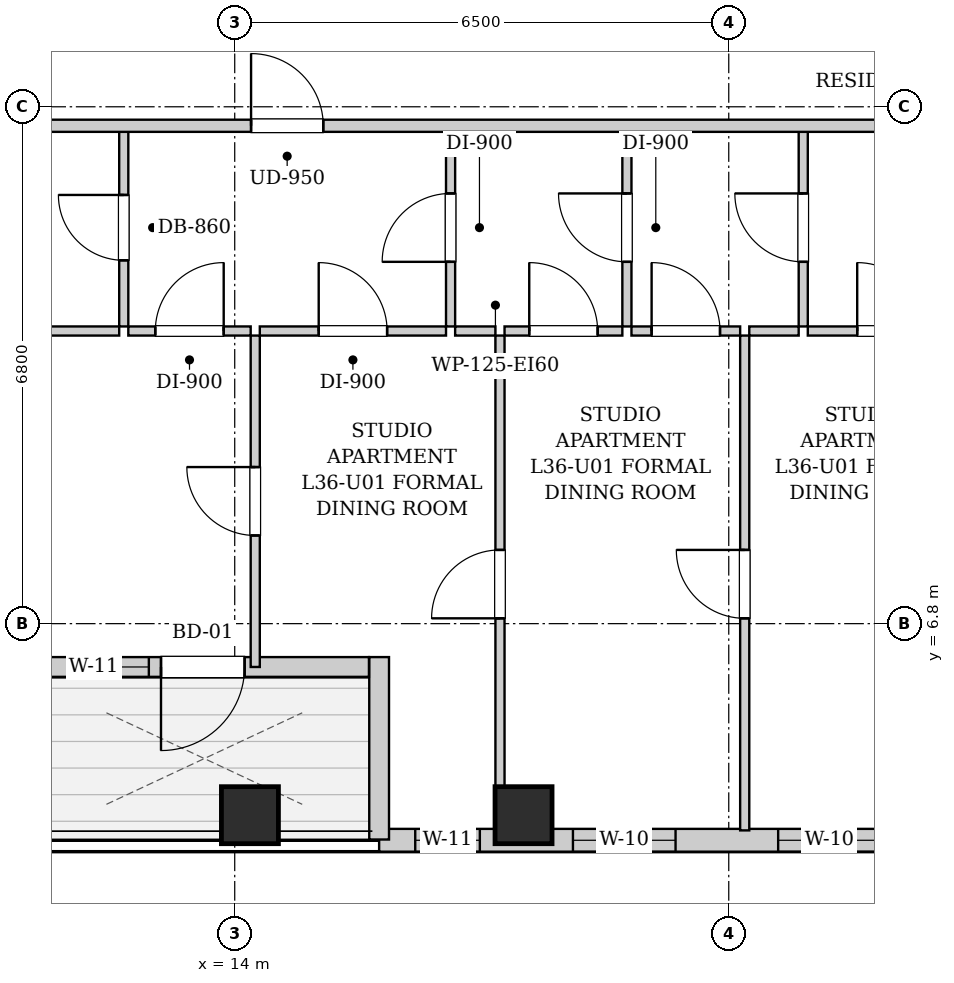
"""IFC4 building model, lengths in metres.
Left out: names, types, materials, properties, quantities, classifications, styles, units other than length and angle.
Written with IfcOpenShell. Run it as: python <this file> out.ifc"""

import sys

from ifc_helpers import new_model, si_unit, direction, frame, frame_2d, origin, origin_2d, place, context, subcontext, project, spatial, rectangle, extrude, element, fill, save


model = new_model("IFC4")
c1 = context("Model", 3, precision=1e-05, world=origin(), true_north=direction((0.0, 1.0)))
c2 = subcontext(c1, "Body", "Model", "MODEL_VIEW")
j1 = project(units=[si_unit("LENGTHUNIT", "METRE"), si_unit("PLANEANGLEUNIT", "RADIAN")], contexts=[c1])
p1 = place(None, origin())
s1 = spatial("IfcSite", under=j1, at=p1, CompositionType="ELEMENT")
p2 = place(p1, origin())
s2 = spatial("IfcBuilding", under=s1, at=p2, CompositionType="ELEMENT")
p3 = place(p2, frame((0.0, 0.0, 127.65)))
s3 = spatial("IfcBuildingStorey", under=s2, at=p3, CompositionType="ELEMENT", Elevation=127.65)
for number, where, z_axis, x_axis in (
    (1, (14.2, 4.28, 0.0), (0.0, 0.0, 1.0), (1.0, 0.0, 0.0)),
    (2, (17.8, 4.28, 0.0), (0.0, 0.0, 1.0), (1.0, 0.0, 0.0)),
):
    element("IfcColumn", number, at=place(p3, frame(where, z_axis=z_axis, x_axis=x_axis)), inside=s3, PredefinedType="COLUMN", context=c2, shape_type="SweptSolid", body=[
        extrude(rectangle(XDim=0.75, YDim=0.75, at=origin_2d()), origin(), (0.0, 0.0, 1.0), 3.25),
    ])
p4 = place(p3, frame((31.5, 3.95, 0.0), z_axis=(0.0, 0.0, 1.0), x_axis=(-1.0, 0.0, 0.0)))
e3 = element("IfcWall", 3, at=p4, inside=s3, PredefinedType="SOLIDWALL", context=c2, shape_type="SweptSolid", body=[
    extrude(rectangle(XDim=15.6, YDim=0.3, at=frame_2d((7.8, 0.0))), origin(), (0.0, 0.0, 1.0), 2.99),
])
p5 = place(p4, frame((14.275, 0.0, 0.55)))
e4 = element("IfcOpeningElement", 4, at=p5, cuts=e3, PredefinedType="OPENING", context=c2, shape_type="SweptSolid", body=[
    extrude(rectangle(XDim=0.85, YDim=1.2, at=frame_2d((0.425, 0.6))), frame((0.0, 0.16, 0.0), z_axis=(0.0, -1.0, 0.0), x_axis=(1.0, 0.0, 0.0)), (0.0, 0.0, 1.0), 0.32),
])
p6 = place(p4, frame((11.7, 0.0, 0.55)))
e5 = element("IfcOpeningElement", 5, at=p6, cuts=e3, PredefinedType="OPENING", context=c2, shape_type="SweptSolid", body=[
    extrude(rectangle(XDim=1.35, YDim=1.2, at=frame_2d((0.675, 0.6))), frame((0.0, 0.16, 0.0), z_axis=(0.0, -1.0, 0.0), x_axis=(1.0, 0.0, 0.0)), (0.0, 0.0, 1.0), 0.32),
])
p7 = place(p4, frame((9.0, 0.0, 0.55)))
e6 = element("IfcOpeningElement", 6, at=p7, cuts=e3, PredefinedType="OPENING", context=c2, shape_type="SweptSolid", body=[
    extrude(rectangle(XDim=1.35, YDim=1.2, at=frame_2d((0.675, 0.6))), frame((0.0, 0.16, 0.0), z_axis=(0.0, -1.0, 0.0), x_axis=(1.0, 0.0, 0.0)), (0.0, 0.0, 1.0), 0.32),
])
p8 = place(p4, frame((2.1, 0.0, 0.55)))
e7 = element("IfcOpeningElement", 7, at=p8, cuts=e3, PredefinedType="OPENING", context=c2, shape_type="SweptSolid", body=[
    extrude(rectangle(XDim=1.35, YDim=1.2, at=frame_2d((0.675, 0.6))), frame((0.0, 0.16, 0.0), z_axis=(0.0, -1.0, 0.0), x_axis=(1.0, 0.0, 0.0)), (0.0, 0.0, 1.0), 0.32),
])
p9 = place(p4, frame((0.23, 0.0, 0.55)))
e8 = element("IfcOpeningElement", 8, at=p9, cuts=e3, PredefinedType="OPENING", context=c2, shape_type="SweptSolid", body=[
    extrude(rectangle(XDim=0.68, YDim=1.2, at=frame_2d((0.34, 0.6))), frame((0.0, 0.16, 0.0), z_axis=(0.0, -1.0, 0.0), x_axis=(1.0, 0.0, 0.0)), (0.0, 0.0, 1.0), 0.32),
])
p10 = place(p3, frame((15.9, 3.96, 0.0), z_axis=(0.0, 0.0, 1.0), x_axis=(0.0, 1.0, 0.0)))
e9 = element("IfcWall", 9, at=p10, inside=s3, PredefinedType="SOLIDWALL", context=c2, shape_type="SweptSolid", body=[
    extrude(rectangle(XDim=2.4, YDim=0.26, at=frame_2d((1.2, 0.0))), origin(), (0.0, 0.0, 1.0), 2.99),
])
p11 = place(p3, frame((15.766, 6.23, 0.0), z_axis=(0.0, 0.0, 1.0), x_axis=(-1.0, 0.0, 0.0)))
e10 = element("IfcWall", 10, at=p11, inside=s3, PredefinedType="SOLIDWALL", context=c2, shape_type="SweptSolid", body=[
    extrude(rectangle(XDim=4.332, YDim=0.26, at=frame_2d((2.166, 0.0))), origin(), (0.0, 0.0, 1.0), 2.99),
])
p12 = place(p11, frame((1.636, 0.0, 0.0)))
e11 = element("IfcOpeningElement", 11, at=p12, cuts=e10, PredefinedType="OPENING", context=c2, shape_type="SweptSolid", body=[
    extrude(rectangle(XDim=1.1, YDim=2.0, at=frame_2d((0.55, 1.0))), frame((0.0, 0.14, 0.0), z_axis=(0.0, -1.0, 0.0), x_axis=(1.0, 0.0, 0.0)), (0.0, 0.0, 1.0), 0.28),
])
p13 = place(p11, frame((2.896, 0.0, 0.55)))
e12 = element("IfcOpeningElement", 12, at=p13, cuts=e10, PredefinedType="OPENING", context=c2, shape_type="SweptSolid", body=[
    extrude(rectangle(XDim=0.85, YDim=1.2, at=frame_2d((0.425, 0.6))), frame((0.0, 0.14, 0.0), z_axis=(0.0, -1.0, 0.0), x_axis=(1.0, 0.0, 0.0)), (0.0, 0.0, 1.0), 0.28),
])
p14 = place(p3, frame((12.54, 10.71, 0.0), z_axis=(0.0, 0.0, 1.0), x_axis=(0.0, 1.0, 0.0)))
e13 = element("IfcWall", 13, at=p14, inside=s3, PredefinedType="PARTITIONING", context=c2, shape_type="SweptSolid", body=[
    extrude(rectangle(XDim=2.6, YDim=0.12, at=frame_2d((1.3, 0.0))), origin(), (0.0, 0.0, 1.0), 2.99),
])
p15 = place(p14, frame((0.87, 0.0, 0.0)))
e14 = element("IfcOpeningElement", 14, at=p15, cuts=e13, PredefinedType="OPENING", context=c2, shape_type="SweptSolid", body=[
    extrude(rectangle(XDim=0.86, YDim=2.05, at=frame_2d((0.43, 1.025))), frame((0.0, 0.07, 0.0), z_axis=(0.0, -1.0, 0.0), x_axis=(1.0, 0.0, 0.0)), (0.0, 0.0, 1.0), 0.14),
])
p16 = place(p3, frame((11.11, 10.65, 0.0), z_axis=(0.0, 0.0, 1.0), x_axis=(1.0, 0.0, 0.0)))
e15 = element("IfcWall", 15, at=p16, inside=s3, PredefinedType="PARTITIONING", context=c2, shape_type="SweptSolid", body=[
    extrude(rectangle(XDim=1.37, YDim=0.12, at=frame_2d((0.685, 0.0))), origin(), (0.0, 0.0, 1.0), 2.99),
])
p17 = place(p3, frame((16.84, 10.71, 0.0), z_axis=(0.0, 0.0, 1.0), x_axis=(0.0, 1.0, 0.0)))
e16 = element("IfcWall", 16, at=p17, inside=s3, PredefinedType="PARTITIONING", context=c2, shape_type="SweptSolid", body=[
    extrude(rectangle(XDim=2.6, YDim=0.12, at=frame_2d((1.3, 0.0))), origin(), (0.0, 0.0, 1.0), 2.99),
])
p18 = place(p17, frame((0.85, 0.0, 0.0)))
e17 = element("IfcOpeningElement", 17, at=p18, cuts=e16, PredefinedType="OPENING", context=c2, shape_type="SweptSolid", body=[
    extrude(rectangle(XDim=0.9, YDim=2.05, at=frame_2d((0.45, 1.025))), frame((0.0, 0.07, 0.0), z_axis=(0.0, -1.0, 0.0), x_axis=(1.0, 0.0, 0.0)), (0.0, 0.0, 1.0), 0.14),
])
p19 = place(p3, frame((12.6, 10.65, 0.0), z_axis=(0.0, 0.0, 1.0), x_axis=(1.0, 0.0, 0.0)))
e18 = element("IfcWall", 18, at=p19, inside=s3, PredefinedType="PARTITIONING", context=c2, shape_type="SweptSolid", body=[
    extrude(rectangle(XDim=1.61, YDim=0.12, at=frame_2d((0.805, 0.0))), origin(), (0.0, 0.0, 1.0), 2.99),
])
p20 = place(p19, frame((0.355, 0.0, 0.0)))
e19 = element("IfcOpeningElement", 19, at=p20, cuts=e18, PredefinedType="OPENING", context=c2, shape_type="SweptSolid", body=[
    extrude(rectangle(XDim=0.9, YDim=2.05, at=frame_2d((0.45, 1.025))), frame((0.0, 0.07, 0.0), z_axis=(0.0, -1.0, 0.0), x_axis=(1.0, 0.0, 0.0)), (0.0, 0.0, 1.0), 0.14),
])
p21 = place(p3, frame((14.33, 10.65, 0.0), z_axis=(0.0, 0.0, 1.0), x_axis=(1.0, 0.0, 0.0)))
e20 = element("IfcWall", 20, at=p21, inside=s3, PredefinedType="PARTITIONING", context=c2, shape_type="SweptSolid", body=[
    extrude(rectangle(XDim=2.45, YDim=0.12, at=frame_2d((1.225, 0.0))), origin(), (0.0, 0.0, 1.0), 2.99),
])
p22 = place(p21, frame((0.775, 0.0, 0.0)))
e21 = element("IfcOpeningElement", 21, at=p22, cuts=e20, PredefinedType="OPENING", context=c2, shape_type="SweptSolid", body=[
    extrude(rectangle(XDim=0.9, YDim=2.05, at=frame_2d((0.45, 1.025))), frame((0.0, 0.07, 0.0), z_axis=(0.0, -1.0, 0.0), x_axis=(1.0, 0.0, 0.0)), (0.0, 0.0, 1.0), 0.14),
])
p23 = place(p3, frame((19.16, 10.71, 0.0), z_axis=(0.0, 0.0, 1.0), x_axis=(0.0, 1.0, 0.0)))
e22 = element("IfcWall", 22, at=p23, inside=s3, PredefinedType="PARTITIONING", context=c2, shape_type="SweptSolid", body=[
    extrude(rectangle(XDim=2.6, YDim=0.12, at=frame_2d((1.3, 0.0))), origin(), (0.0, 0.0, 1.0), 2.99),
])
p24 = place(p23, frame((0.85, 0.0, 0.0)))
e23 = element("IfcOpeningElement", 23, at=p24, cuts=e22, PredefinedType="OPENING", context=c2, shape_type="SweptSolid", body=[
    extrude(rectangle(XDim=0.9, YDim=2.05, at=frame_2d((0.45, 1.025))), frame((0.0, 0.07, 0.0), z_axis=(0.0, -1.0, 0.0), x_axis=(1.0, 0.0, 0.0)), (0.0, 0.0, 1.0), 0.14),
])
p25 = place(p3, frame((16.9, 10.65, 0.0), z_axis=(0.0, 0.0, 1.0), x_axis=(1.0, 0.0, 0.0)))
e24 = element("IfcWall", 24, at=p25, inside=s3, PredefinedType="PARTITIONING", context=c2, shape_type="SweptSolid", body=[
    extrude(rectangle(XDim=0.53, YDim=0.12, at=frame_2d((0.265, 0.0))), origin(), (0.0, 0.0, 1.0), 2.99),
])
p26 = place(p3, frame((17.55, 10.65, 0.0), z_axis=(0.0, 0.0, 1.0), x_axis=(1.0, 0.0, 0.0)))
e25 = element("IfcWall", 25, at=p26, inside=s3, PredefinedType="PARTITIONING", context=c2, shape_type="SweptSolid", body=[
    extrude(rectangle(XDim=1.55, YDim=0.12, at=frame_2d((0.775, 0.0))), origin(), (0.0, 0.0, 1.0), 2.99),
])
p27 = place(p26, frame((0.325, 0.0, 0.0)))
e26 = element("IfcOpeningElement", 26, at=p27, cuts=e25, PredefinedType="OPENING", context=c2, shape_type="SweptSolid", body=[
    extrude(rectangle(XDim=0.9, YDim=2.05, at=frame_2d((0.45, 1.025))), frame((0.0, 0.07, 0.0), z_axis=(0.0, -1.0, 0.0), x_axis=(1.0, 0.0, 0.0)), (0.0, 0.0, 1.0), 0.14),
])
p28 = place(p3, frame((21.48, 10.71, 0.0), z_axis=(0.0, 0.0, 1.0), x_axis=(0.0, 1.0, 0.0)))
e27 = element("IfcWall", 27, at=p28, inside=s3, PredefinedType="PARTITIONING", context=c2, shape_type="SweptSolid", body=[
    extrude(rectangle(XDim=2.6, YDim=0.12, at=frame_2d((1.3, 0.0))), origin(), (0.0, 0.0, 1.0), 2.99),
])
p29 = place(p28, frame((0.85, 0.0, 0.0)))
e28 = element("IfcOpeningElement", 28, at=p29, cuts=e27, PredefinedType="OPENING", context=c2, shape_type="SweptSolid", body=[
    extrude(rectangle(XDim=0.9, YDim=2.05, at=frame_2d((0.45, 1.025))), frame((0.0, 0.07, 0.0), z_axis=(0.0, -1.0, 0.0), x_axis=(1.0, 0.0, 0.0)), (0.0, 0.0, 1.0), 0.14),
])
p30 = place(p3, frame((19.22, 10.65, 0.0), z_axis=(0.0, 0.0, 1.0), x_axis=(1.0, 0.0, 0.0)))
e29 = element("IfcWall", 29, at=p30, inside=s3, PredefinedType="PARTITIONING", context=c2, shape_type="SweptSolid", body=[
    extrude(rectangle(XDim=1.43, YDim=0.12, at=frame_2d((0.715, 0.0))), origin(), (0.0, 0.0, 1.0), 2.99),
])
p31 = place(p30, frame((0.265, 0.0, 0.0)))
e30 = element("IfcOpeningElement", 30, at=p31, cuts=e29, PredefinedType="OPENING", context=c2, shape_type="SweptSolid", body=[
    extrude(rectangle(XDim=0.9, YDim=2.05, at=frame_2d((0.45, 1.025))), frame((0.0, 0.07, 0.0), z_axis=(0.0, -1.0, 0.0), x_axis=(1.0, 0.0, 0.0)), (0.0, 0.0, 1.0), 0.14),
])
p32 = place(p3, frame((20.77, 10.65, 0.0), z_axis=(0.0, 0.0, 1.0), x_axis=(1.0, 0.0, 0.0)))
e31 = element("IfcWall", 31, at=p32, inside=s3, PredefinedType="PARTITIONING", context=c2, shape_type="SweptSolid", body=[
    extrude(rectangle(XDim=0.65, YDim=0.12, at=frame_2d((0.325, 0.0))), origin(), (0.0, 0.0, 1.0), 2.99),
])
p33 = place(p3, frame((21.54, 10.65, 0.0), z_axis=(0.0, 0.0, 1.0), x_axis=(1.0, 0.0, 0.0)))
e32 = element("IfcWall", 32, at=p33, inside=s3, PredefinedType="PARTITIONING", context=c2, shape_type="SweptSolid", body=[
    extrude(rectangle(XDim=2.2, YDim=0.12, at=frame_2d((1.1, 0.0))), origin(), (0.0, 0.0, 1.0), 2.99),
])
p34 = place(p33, frame((0.65, 0.0, 0.0)))
e33 = element("IfcOpeningElement", 33, at=p34, cuts=e32, PredefinedType="OPENING", context=c2, shape_type="SweptSolid", body=[
    extrude(rectangle(XDim=0.9, YDim=2.05, at=frame_2d((0.45, 1.025))), frame((0.0, 0.07, 0.0), z_axis=(0.0, -1.0, 0.0), x_axis=(1.0, 0.0, 0.0)), (0.0, 0.0, 1.0), 0.14),
])
p35 = place(p3, frame((14.27, 6.23, 0.0), z_axis=(0.0, 0.0, 1.0), x_axis=(0.0, 1.0, 0.0)))
e34 = element("IfcWall", 34, at=p35, inside=s3, PredefinedType="PARTITIONING", context=c2, shape_type="SweptSolid", body=[
    extrude(rectangle(XDim=4.36, YDim=0.12, at=frame_2d((2.18, 0.0))), origin(), (0.0, 0.0, 1.0), 2.99),
])
p36 = place(p35, frame((1.73, 0.0, 0.0)))
e35 = element("IfcOpeningElement", 35, at=p36, cuts=e34, PredefinedType="OPENING", context=c2, shape_type="SweptSolid", body=[
    extrude(rectangle(XDim=0.9, YDim=2.05, at=frame_2d((0.45, 1.025))), frame((0.0, 0.07, 0.0), z_axis=(0.0, -1.0, 0.0), x_axis=(1.0, 0.0, 0.0)), (0.0, 0.0, 1.0), 0.14),
])
p37 = place(p3, frame((17.49, 4.08, 0.0), z_axis=(0.0, 0.0, 1.0), x_axis=(0.0, 1.0, 0.0)))
e36 = element("IfcWall", 36, at=p37, inside=s3, PredefinedType="PARTITIONING", context=c2, shape_type="SweptSolid", body=[
    extrude(rectangle(XDim=6.51, YDim=0.12, at=frame_2d((3.255, 0.0))), origin(), (0.0, 0.0, 1.0), 2.99),
])
p38 = place(p37, frame((2.79, 0.0, 0.0)))
e37 = element("IfcOpeningElement", 37, at=p38, cuts=e36, PredefinedType="OPENING", context=c2, shape_type="SweptSolid", body=[
    extrude(rectangle(XDim=0.9, YDim=2.05, at=frame_2d((0.45, 1.025))), frame((0.0, 0.07, 0.0), z_axis=(0.0, -1.0, 0.0), x_axis=(1.0, 0.0, 0.0)), (0.0, 0.0, 1.0), 0.14),
])
p39 = place(p3, frame((20.71, 4.08, 0.0), z_axis=(0.0, 0.0, 1.0), x_axis=(0.0, 1.0, 0.0)))
e38 = element("IfcWall", 38, at=p39, inside=s3, PredefinedType="PARTITIONING", context=c2, shape_type="SweptSolid", body=[
    extrude(rectangle(XDim=6.51, YDim=0.12, at=frame_2d((3.255, 0.0))), origin(), (0.0, 0.0, 1.0), 2.99),
])
p40 = place(p39, frame((2.79, 0.0, 0.0)))
e39 = element("IfcOpeningElement", 39, at=p40, cuts=e38, PredefinedType="OPENING", context=c2, shape_type="SweptSolid", body=[
    extrude(rectangle(XDim=0.9, YDim=2.05, at=frame_2d((0.45, 1.025))), frame((0.0, 0.07, 0.0), z_axis=(0.0, -1.0, 0.0), x_axis=(1.0, 0.0, 0.0)), (0.0, 0.0, 1.0), 0.14),
])
p41 = place(p3, frame((10.05, 13.35, 0.0), z_axis=(0.0, 0.0, 1.0), x_axis=(1.0, 0.0, 0.0)))
e40 = element("IfcWall", 40, at=p41, inside=s3, PredefinedType="PARTITIONING", context=c2, shape_type="SweptSolid", body=[
    extrude(rectangle(XDim=27.7, YDim=0.16, at=frame_2d((13.85, 0.0))), origin(), (0.0, 0.0, 1.0), 2.99),
])
p42 = place(p41, frame((4.165, 0.0, 0.0)))
e41 = element("IfcOpeningElement", 41, at=p42, cuts=e40, PredefinedType="OPENING", context=c2, shape_type="SweptSolid", body=[
    extrude(rectangle(XDim=0.95, YDim=2.1, at=frame_2d((0.475, 1.05))), frame((0.0, 0.09, 0.0), z_axis=(0.0, -1.0, 0.0), x_axis=(1.0, 0.0, 0.0)), (0.0, 0.0, 1.0), 0.18),
])
p43 = place(p15, origin())
e42 = element("IfcDoor", 42, at=p43, inside=s3, OperationType="SINGLE_SWING_RIGHT", PredefinedType="DOOR", context=c2, shape_type="SweptSolid", body=[
    extrude(rectangle(XDim=0.86, YDim=2.05, at=frame_2d((0.43, 1.025))), frame((0.0, 0.025, 0.0), z_axis=(0.0, -1.0, 0.0), x_axis=(1.0, 0.0, 0.0)), (0.0, 0.0, 1.0), 0.05),
])
fill(e14, e42)
p44 = place(p18, origin())
e43 = element("IfcDoor", 43, at=p44, inside=s3, OperationType="SINGLE_SWING_LEFT", PredefinedType="DOOR", context=c2, shape_type="SweptSolid", body=[
    extrude(rectangle(XDim=0.9, YDim=2.05, at=frame_2d((0.45, 1.025))), frame((0.0, 0.025, 0.0), z_axis=(0.0, -1.0, 0.0), x_axis=(1.0, 0.0, 0.0)), (0.0, 0.0, 1.0), 0.05),
])
fill(e17, e43)
p45 = place(p20, origin())
e44 = element("IfcDoor", 44, at=p45, inside=s3, OperationType="SINGLE_SWING_RIGHT", PredefinedType="DOOR", context=c2, shape_type="SweptSolid", body=[
    extrude(rectangle(XDim=0.9, YDim=2.05, at=frame_2d((0.45, 1.025))), frame((0.0, 0.025, 0.0), z_axis=(0.0, -1.0, 0.0), x_axis=(1.0, 0.0, 0.0)), (0.0, 0.0, 1.0), 0.05),
])
fill(e19, e44)
p46 = place(p22, origin())
e45 = element("IfcDoor", 45, at=p46, inside=s3, OperationType="SINGLE_SWING_LEFT", PredefinedType="DOOR", context=c2, shape_type="SweptSolid", body=[
    extrude(rectangle(XDim=0.9, YDim=2.05, at=frame_2d((0.45, 1.025))), frame((0.0, 0.025, 0.0), z_axis=(0.0, -1.0, 0.0), x_axis=(1.0, 0.0, 0.0)), (0.0, 0.0, 1.0), 0.05),
])
fill(e21, e45)
p47 = place(p24, origin())
e46 = element("IfcDoor", 46, at=p47, inside=s3, OperationType="SINGLE_SWING_RIGHT", PredefinedType="DOOR", context=c2, shape_type="SweptSolid", body=[
    extrude(rectangle(XDim=0.9, YDim=2.05, at=frame_2d((0.45, 1.025))), frame((0.0, 0.025, 0.0), z_axis=(0.0, -1.0, 0.0), x_axis=(1.0, 0.0, 0.0)), (0.0, 0.0, 1.0), 0.05),
])
fill(e23, e46)
p48 = place(p27, origin())
e47 = element("IfcDoor", 47, at=p48, inside=s3, OperationType="SINGLE_SWING_LEFT", PredefinedType="DOOR", context=c2, shape_type="SweptSolid", body=[
    extrude(rectangle(XDim=0.9, YDim=2.05, at=frame_2d((0.45, 1.025))), frame((0.0, 0.025, 0.0), z_axis=(0.0, -1.0, 0.0), x_axis=(1.0, 0.0, 0.0)), (0.0, 0.0, 1.0), 0.05),
])
fill(e26, e47)
p49 = place(p29, origin())
e48 = element("IfcDoor", 48, at=p49, inside=s3, OperationType="SINGLE_SWING_RIGHT", PredefinedType="DOOR", context=c2, shape_type="SweptSolid", body=[
    extrude(rectangle(XDim=0.9, YDim=2.05, at=frame_2d((0.45, 1.025))), frame((0.0, 0.025, 0.0), z_axis=(0.0, -1.0, 0.0), x_axis=(1.0, 0.0, 0.0)), (0.0, 0.0, 1.0), 0.05),
])
fill(e28, e48)
p50 = place(p31, origin())
e49 = element("IfcDoor", 49, at=p50, inside=s3, OperationType="SINGLE_SWING_LEFT", PredefinedType="DOOR", context=c2, shape_type="SweptSolid", body=[
    extrude(rectangle(XDim=0.9, YDim=2.05, at=frame_2d((0.45, 1.025))), frame((0.0, 0.025, 0.0), z_axis=(0.0, -1.0, 0.0), x_axis=(1.0, 0.0, 0.0)), (0.0, 0.0, 1.0), 0.05),
])
fill(e30, e49)
p51 = place(p34, origin())
e50 = element("IfcDoor", 50, at=p51, inside=s3, OperationType="SINGLE_SWING_LEFT", PredefinedType="DOOR", context=c2, shape_type="SweptSolid", body=[
    extrude(rectangle(XDim=0.9, YDim=2.05, at=frame_2d((0.45, 1.025))), frame((0.0, 0.025, 0.0), z_axis=(0.0, -1.0, 0.0), x_axis=(1.0, 0.0, 0.0)), (0.0, 0.0, 1.0), 0.05),
])
fill(e33, e50)
p52 = place(p36, origin())
e51 = element("IfcDoor", 51, at=p52, inside=s3, OperationType="SINGLE_SWING_RIGHT", PredefinedType="DOOR", context=c2, shape_type="SweptSolid", body=[
    extrude(rectangle(XDim=0.9, YDim=2.05, at=frame_2d((0.45, 1.025))), frame((0.0, 0.025, 0.0), z_axis=(0.0, -1.0, 0.0), x_axis=(1.0, 0.0, 0.0)), (0.0, 0.0, 1.0), 0.05),
])
fill(e35, e51)
p53 = place(p38, origin())
e52 = element("IfcDoor", 52, at=p53, inside=s3, OperationType="SINGLE_SWING_LEFT", PredefinedType="DOOR", context=c2, shape_type="SweptSolid", body=[
    extrude(rectangle(XDim=0.9, YDim=2.05, at=frame_2d((0.45, 1.025))), frame((0.0, 0.025, 0.0), z_axis=(0.0, -1.0, 0.0), x_axis=(1.0, 0.0, 0.0)), (0.0, 0.0, 1.0), 0.05),
])
fill(e37, e52)
p54 = place(p40, origin())
e53 = element("IfcDoor", 53, at=p54, inside=s3, OperationType="SINGLE_SWING_RIGHT", PredefinedType="DOOR", context=c2, shape_type="SweptSolid", body=[
    extrude(rectangle(XDim=0.9, YDim=2.05, at=frame_2d((0.45, 1.025))), frame((0.0, 0.025, 0.0), z_axis=(0.0, -1.0, 0.0), x_axis=(1.0, 0.0, 0.0)), (0.0, 0.0, 1.0), 0.05),
])
fill(e39, e53)
p55 = place(p42, origin())
e54 = element("IfcDoor", 54, at=p55, inside=s3, OperationType="SINGLE_SWING_LEFT", PredefinedType="DOOR", context=c2, shape_type="SweptSolid", body=[
    extrude(rectangle(XDim=0.95, YDim=2.1, at=frame_2d((0.475, 1.05))), frame((0.0, 0.025, 0.0), z_axis=(0.0, -1.0, 0.0), x_axis=(1.0, 0.0, 0.0)), (0.0, 0.0, 1.0), 0.05),
])
fill(e41, e54)
p56 = place(p12, origin())
e55 = element("IfcDoor", 55, at=p56, inside=s3, OperationType="SINGLE_SWING_RIGHT", PredefinedType="DOOR", context=c2, shape_type="SweptSolid", body=[
    extrude(rectangle(XDim=1.1, YDim=2.0, at=frame_2d((0.55, 1.0))), frame((0.0, 0.025, 0.0), z_axis=(0.0, -1.0, 0.0), x_axis=(1.0, 0.0, 0.0)), (0.0, 0.0, 1.0), 0.05),
])
fill(e11, e55)
p57 = place(p13, origin())
e56 = element("IfcWindow", 56, at=p57, inside=s3, PartitioningType="SINGLE_PANEL", PredefinedType="WINDOW", context=c2, shape_type="SweptSolid", body=[
    extrude(rectangle(XDim=0.85, YDim=1.2, at=frame_2d((0.425, 0.6))), frame((0.0, 0.03, 0.0), z_axis=(0.0, -1.0, 0.0), x_axis=(1.0, 0.0, 0.0)), (0.0, 0.0, 1.0), 0.06),
])
fill(e12, e56)
p58 = place(p5, origin())
e57 = element("IfcWindow", 57, at=p58, inside=s3, PartitioningType="SINGLE_PANEL", PredefinedType="WINDOW", context=c2, shape_type="SweptSolid", body=[
    extrude(rectangle(XDim=0.85, YDim=1.2, at=frame_2d((0.425, 0.6))), frame((0.0, 0.03, 0.0), z_axis=(0.0, -1.0, 0.0), x_axis=(1.0, 0.0, 0.0)), (0.0, 0.0, 1.0), 0.06),
])
fill(e4, e57)
p59 = place(p6, origin())
e58 = element("IfcWindow", 58, at=p59, inside=s3, PartitioningType="SINGLE_PANEL", PredefinedType="WINDOW", context=c2, shape_type="SweptSolid", body=[
    extrude(rectangle(XDim=1.35, YDim=1.2, at=frame_2d((0.675, 0.6))), frame((0.0, 0.03, 0.0), z_axis=(0.0, -1.0, 0.0), x_axis=(1.0, 0.0, 0.0)), (0.0, 0.0, 1.0), 0.06),
])
fill(e5, e58)
p60 = place(p7, origin())
e59 = element("IfcWindow", 59, at=p60, inside=s3, PartitioningType="SINGLE_PANEL", PredefinedType="WINDOW", context=c2, shape_type="SweptSolid", body=[
    extrude(rectangle(XDim=1.35, YDim=1.2, at=frame_2d((0.675, 0.6))), frame((0.0, 0.03, 0.0), z_axis=(0.0, -1.0, 0.0), x_axis=(1.0, 0.0, 0.0)), (0.0, 0.0, 1.0), 0.06),
])
fill(e6, e59)
save(model, sys.argv[1])
